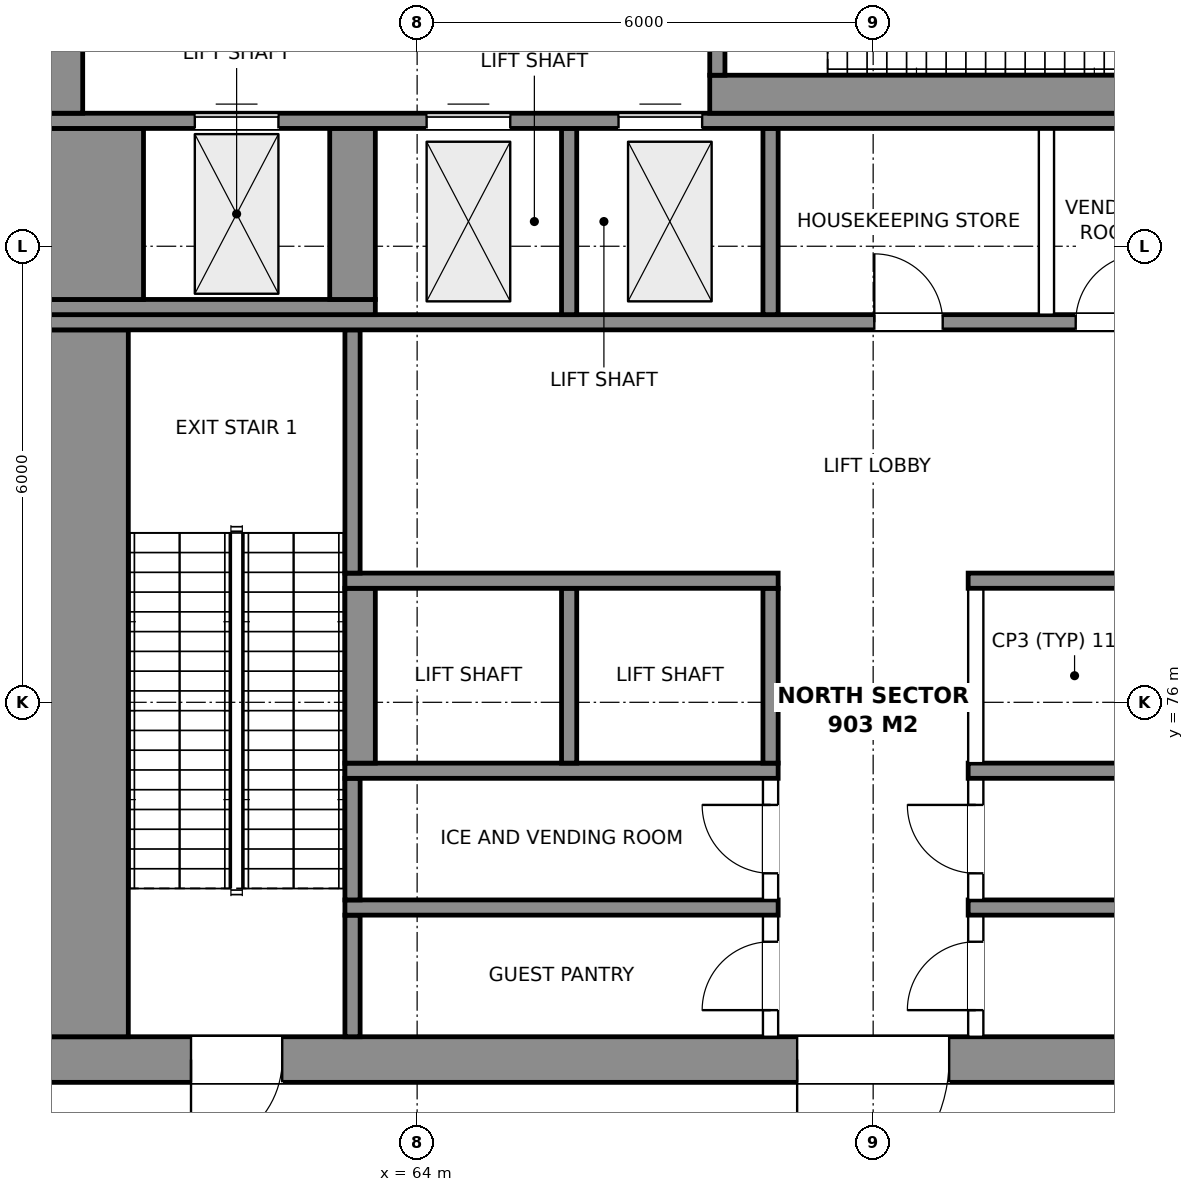
"""IFC4 building model, lengths in metres.
Left out: names, types, materials, properties, quantities, classifications, styles, units other than length and angle.
Written with IfcOpenShell. Run it as: python <this file> out.ifc"""

import sys

from ifc_helpers import new_model, si_unit, direction, frame, frame_2d, origin, place, context, subcontext, project, spatial, rectangle, extrude, element, fill, save


model = new_model("IFC4")
c1 = context("Model", 3, precision=1e-05, world=origin(), true_north=direction((0.0, 1.0)))
c2 = subcontext(c1, "Body", "Model", "MODEL_VIEW")
j1 = project(units=[si_unit("LENGTHUNIT", "METRE"), si_unit("PLANEANGLEUNIT", "RADIAN")], contexts=[c1])
p1 = place(None, origin())
s1 = spatial("IfcSite", under=j1, at=p1, CompositionType="ELEMENT")
p2 = place(p1, origin())
s2 = spatial("IfcBuilding", under=s1, at=p2, CompositionType="ELEMENT")
p3 = place(p2, frame((0.0, 0.0, 321.7)))
s3 = spatial("IfcBuildingStorey", under=s2, at=p3, CompositionType="ELEMENT", Elevation=321.7)
p4 = place(p3, frame((59.0, 71.3, 0.0), z_axis=(0.0, 0.0, 1.0), x_axis=(1.0, 0.0, 0.0)))
e1 = element("IfcWall", 1, at=p4, inside=s3, PredefinedType="SHEAR", context=c2, shape_type="SweptSolid", body=[
    extrude(rectangle(XDim=22.0, YDim=0.6, at=frame_2d((11.0, 0.0))), origin(), (0.0, 0.0, 1.0), 7.0),
])
p5 = place(p4, frame((2.025, 0.0, 0.0)))
e2 = element("IfcOpeningElement", 2, at=p5, cuts=e1, PredefinedType="OPENING", context=c2, shape_type="SweptSolid", body=[
    extrude(rectangle(XDim=1.2, YDim=2.1, at=frame_2d((0.6, 1.05))), frame((0.0, 0.31, 0.0), z_axis=(0.0, -1.0, 0.0), x_axis=(1.0, 0.0, 0.0)), (0.0, 0.0, 1.0), 0.62),
])
p6 = place(p4, frame((18.775, 0.0, 0.0)))
e3 = element("IfcOpeningElement", 3, at=p6, cuts=e1, PredefinedType="OPENING", context=c2, shape_type="SweptSolid", body=[
    extrude(rectangle(XDim=1.2, YDim=2.1, at=frame_2d((0.6, 1.05))), frame((0.0, 0.31, 0.0), z_axis=(0.0, -1.0, 0.0), x_axis=(1.0, 0.0, 0.0)), (0.0, 0.0, 1.0), 0.62),
])
p7 = place(p4, frame((10.0, 0.0, 0.0)))
e4 = element("IfcOpeningElement", 4, at=p7, cuts=e1, PredefinedType="OPENING", context=c2, shape_type="SweptSolid", body=[
    extrude(rectangle(XDim=2.0, YDim=2.1, at=frame_2d((1.0, 1.05))), frame((0.0, 0.31, 0.0), z_axis=(0.0, -1.0, 0.0), x_axis=(1.0, 0.0, 0.0)), (0.0, 0.0, 1.0), 0.62),
])
p8 = place(p3, frame((59.6, 71.6, 0.0), z_axis=(0.0, 0.0, 1.0), x_axis=(0.0, 1.0, 0.0)))
e5 = element("IfcWall", 5, at=p8, inside=s3, PredefinedType="SHEAR", context=c2, shape_type="SweptSolid", body=[
    extrude(rectangle(XDim=9.3, YDim=1.2, at=frame_2d((4.65, 0.0))), origin(), (0.0, 0.0, 1.0), 7.0),
])
p9 = place(p3, frame((63.15, 71.6, 0.0), z_axis=(0.0, 0.0, 1.0), x_axis=(0.0, 1.0, 0.0)))
e6 = element("IfcWall", 6, at=p9, inside=s3, PredefinedType="SHEAR", context=c2, shape_type="SweptSolid", body=[
    extrude(rectangle(XDim=1.6, YDim=0.2, at=frame_2d((0.8, 0.0))), origin(), (0.0, 0.0, 1.0), 7.0),
])
p10 = place(p3, frame((68.65, 71.6, 0.0), z_axis=(0.0, 0.0, 1.0), x_axis=(0.0, 1.0, 0.0)))
e7 = element("IfcWall", 7, at=p10, inside=s3, PredefinedType="PARTITIONING", context=c2, shape_type="SweptSolid", body=[
    extrude(rectangle(XDim=1.6, YDim=0.2, at=frame_2d((0.8, 0.0))), origin(), (0.0, 0.0, 1.0), 6.7),
])
p11 = place(p10, frame((0.35, 0.0, 0.0)))
e8 = element("IfcOpeningElement", 8, at=p11, cuts=e7, PredefinedType="OPENING", context=c2, shape_type="SweptSolid", body=[
    extrude(rectangle(XDim=0.9, YDim=2.1, at=frame_2d((0.45, 1.05))), frame((0.0, 0.11, 0.0), z_axis=(0.0, -1.0, 0.0), x_axis=(1.0, 0.0, 0.0)), (0.0, 0.0, 1.0), 0.22),
])
p12 = place(p3, frame((71.35, 71.6, 0.0), z_axis=(0.0, 0.0, 1.0), x_axis=(0.0, 1.0, 0.0)))
e9 = element("IfcWall", 9, at=p12, inside=s3, PredefinedType="PARTITIONING", context=c2, shape_type="SweptSolid", body=[
    extrude(rectangle(XDim=1.6, YDim=0.2, at=frame_2d((0.8, 0.0))), origin(), (0.0, 0.0, 1.0), 6.7),
])
p13 = place(p12, frame((0.35, 0.0, 0.0)))
e10 = element("IfcOpeningElement", 10, at=p13, cuts=e9, PredefinedType="OPENING", context=c2, shape_type="SweptSolid", body=[
    extrude(rectangle(XDim=0.9, YDim=2.1, at=frame_2d((0.45, 1.05))), frame((0.0, 0.11, 0.0), z_axis=(0.0, -1.0, 0.0), x_axis=(1.0, 0.0, 0.0)), (0.0, 0.0, 1.0), 0.22),
])
for number, where, z_axis, x_axis in (
    (11, (63.05, 73.3, 0.0), (0.0, 0.0, 1.0), (1.0, 0.0, 0.0)),
    (12, (71.25, 73.3, 0.0), (0.0, 0.0, 1.0), (1.0, 0.0, 0.0)),
):
    element("IfcWall", number, at=place(p3, frame(where, z_axis=z_axis, x_axis=x_axis)), inside=s3, PredefinedType="SHEAR", context=c2, shape_type="SweptSolid", body=[
        extrude(rectangle(XDim=5.7, YDim=0.2, at=frame_2d((2.85, 0.0))), origin(), (0.0, 0.0, 1.0), 7.0),
    ])
p14 = place(p3, frame((63.15, 73.4, 0.0), z_axis=(0.0, 0.0, 1.0), x_axis=(0.0, 1.0, 0.0)))
e13 = element("IfcWall", 13, at=p14, inside=s3, PredefinedType="SHEAR", context=c2, shape_type="SweptSolid", body=[
    extrude(rectangle(XDim=1.6, YDim=0.2, at=frame_2d((0.8, 0.0))), origin(), (0.0, 0.0, 1.0), 7.0),
])
p15 = place(p3, frame((68.65, 73.4, 0.0), z_axis=(0.0, 0.0, 1.0), x_axis=(0.0, 1.0, 0.0)))
e14 = element("IfcWall", 14, at=p15, inside=s3, PredefinedType="PARTITIONING", context=c2, shape_type="SweptSolid", body=[
    extrude(rectangle(XDim=1.6, YDim=0.2, at=frame_2d((0.8, 0.0))), origin(), (0.0, 0.0, 1.0), 6.7),
])
p16 = place(p15, frame((0.35, 0.0, 0.0)))
e15 = element("IfcOpeningElement", 15, at=p16, cuts=e14, PredefinedType="OPENING", context=c2, shape_type="SweptSolid", body=[
    extrude(rectangle(XDim=0.9, YDim=2.1, at=frame_2d((0.45, 1.05))), frame((0.0, 0.11, 0.0), z_axis=(0.0, -1.0, 0.0), x_axis=(1.0, 0.0, 0.0)), (0.0, 0.0, 1.0), 0.22),
])
p17 = place(p3, frame((71.35, 73.4, 0.0), z_axis=(0.0, 0.0, 1.0), x_axis=(0.0, 1.0, 0.0)))
e16 = element("IfcWall", 16, at=p17, inside=s3, PredefinedType="PARTITIONING", context=c2, shape_type="SweptSolid", body=[
    extrude(rectangle(XDim=1.6, YDim=0.2, at=frame_2d((0.8, 0.0))), origin(), (0.0, 0.0, 1.0), 6.7),
])
p18 = place(p17, frame((0.35, 0.0, 0.0)))
e17 = element("IfcOpeningElement", 17, at=p18, cuts=e16, PredefinedType="OPENING", context=c2, shape_type="SweptSolid", body=[
    extrude(rectangle(XDim=0.9, YDim=2.1, at=frame_2d((0.45, 1.05))), frame((0.0, 0.11, 0.0), z_axis=(0.0, -1.0, 0.0), x_axis=(1.0, 0.0, 0.0)), (0.0, 0.0, 1.0), 0.22),
])
for number, where, z_axis, x_axis in (
    (18, (63.05, 75.1, 0.0), (0.0, 0.0, 1.0), (1.0, 0.0, 0.0)),
    (19, (71.25, 75.1, 0.0), (0.0, 0.0, 1.0), (1.0, 0.0, 0.0)),
):
    element("IfcWall", number, at=place(p3, frame(where, z_axis=z_axis, x_axis=x_axis)), inside=s3, PredefinedType="SHEAR", context=c2, shape_type="SweptSolid", body=[
        extrude(rectangle(XDim=5.7, YDim=0.2, at=frame_2d((2.85, 0.0))), origin(), (0.0, 0.0, 1.0), 7.0),
    ])
p19 = place(p3, frame((63.25, 75.2, 0.0), z_axis=(0.0, 0.0, 1.0), x_axis=(0.0, 1.0, 0.0)))
e20 = element("IfcWall", 20, at=p19, inside=s3, PredefinedType="SHEAR", context=c2, shape_type="SweptSolid", body=[
    extrude(rectangle(XDim=2.3, YDim=0.4, at=frame_2d((1.15, 0.0))), origin(), (0.0, 0.0, 1.0), 7.0),
])
for number, where, z_axis, x_axis in (
    (21, (66.0, 75.2, 0.0), (0.0, 0.0, 1.0), (0.0, 1.0, 0.0)),
    (22, (68.65, 75.2, 0.0), (0.0, 0.0, 1.0), (0.0, 1.0, 0.0)),
):
    element("IfcWall", number, at=place(p3, frame(where, z_axis=z_axis, x_axis=x_axis)), inside=s3, PredefinedType="SHEAR", context=c2, shape_type="SweptSolid", body=[
        extrude(rectangle(XDim=2.3, YDim=0.2, at=frame_2d((1.15, 0.0))), origin(), (0.0, 0.0, 1.0), 7.0),
    ])
p20 = place(p3, frame((71.35, 75.2, 0.0), z_axis=(0.0, 0.0, 1.0), x_axis=(0.0, 1.0, 0.0)))
e23 = element("IfcWall", 23, at=p20, inside=s3, PredefinedType="PARTITIONING", context=c2, shape_type="SweptSolid", body=[
    extrude(rectangle(XDim=2.3, YDim=0.2, at=frame_2d((1.15, 0.0))), origin(), (0.0, 0.0, 1.0), 6.7),
])
p21 = place(p3, frame((63.05, 77.6, 0.0), z_axis=(0.0, 0.0, 1.0), x_axis=(1.0, 0.0, 0.0)))
e24 = element("IfcWall", 24, at=p21, inside=s3, PredefinedType="SHEAR", context=c2, shape_type="SweptSolid", body=[
    extrude(rectangle(XDim=5.7, YDim=0.2, at=frame_2d((2.85, 0.0))), origin(), (0.0, 0.0, 1.0), 7.0),
])
p22 = place(p3, frame((71.25, 77.6, 0.0), z_axis=(0.0, 0.0, 1.0), x_axis=(1.0, 0.0, 0.0)))
e25 = element("IfcWall", 25, at=p22, inside=s3, PredefinedType="SHEAR", context=c2, shape_type="SweptSolid", body=[
    extrude(rectangle(XDim=5.7, YDim=0.2, at=frame_2d((2.85, 0.0))), origin(), (0.0, 0.0, 1.0), 7.0),
])
p23 = place(p22, frame((2.3, 0.0, 0.0)))
e26 = element("IfcOpeningElement", 26, at=p23, cuts=e25, PredefinedType="OPENING", context=c2, shape_type="SweptSolid", body=[
    extrude(rectangle(XDim=0.9, YDim=2.1, at=frame_2d((0.45, 1.05))), frame((0.0, 0.11, 0.0), z_axis=(0.0, -1.0, 0.0), x_axis=(1.0, 0.0, 0.0)), (0.0, 0.0, 1.0), 0.22),
])
p24 = place(p3, frame((63.15, 77.7, 0.0), z_axis=(0.0, 0.0, 1.0), x_axis=(0.0, 1.0, 0.0)))
e27 = element("IfcWall", 27, at=p24, inside=s3, PredefinedType="SHEAR", context=c2, shape_type="SweptSolid", body=[
    extrude(rectangle(XDim=3.2, YDim=0.2, at=frame_2d((1.6, 0.0))), origin(), (0.0, 0.0, 1.0), 7.0),
])
p25 = place(p3, frame((59.0, 81.0, 0.0), z_axis=(0.0, 0.0, 1.0), x_axis=(1.0, 0.0, 0.0)))
e28 = element("IfcWall", 28, at=p25, inside=s3, PredefinedType="SHEAR", context=c2, shape_type="SweptSolid", body=[
    extrude(rectangle(XDim=22.0, YDim=0.2, at=frame_2d((11.0, 0.0))), origin(), (0.0, 0.0, 1.0), 7.0),
])
p26 = place(p25, frame((15.725, 0.0, 0.0)))
e29 = element("IfcOpeningElement", 29, at=p26, cuts=e28, PredefinedType="OPENING", context=c2, shape_type="SweptSolid", body=[
    extrude(rectangle(XDim=1.1, YDim=2.1, at=frame_2d((0.55, 1.05))), frame((0.0, 0.11, 0.0), z_axis=(0.0, -1.0, 0.0), x_axis=(1.0, 0.0, 0.0)), (0.0, 0.0, 1.0), 0.22),
])
p27 = place(p25, frame((11.015, 0.0, 0.0)))
e30 = element("IfcOpeningElement", 30, at=p27, cuts=e28, PredefinedType="OPENING", context=c2, shape_type="SweptSolid", body=[
    extrude(rectangle(XDim=0.9, YDim=2.1, at=frame_2d((0.45, 1.05))), frame((0.0, 0.11, 0.0), z_axis=(0.0, -1.0, 0.0), x_axis=(1.0, 0.0, 0.0)), (0.0, 0.0, 1.0), 0.22),
])
p28 = place(p25, frame((13.665, 0.0, 0.0)))
e31 = element("IfcOpeningElement", 31, at=p28, cuts=e28, PredefinedType="OPENING", context=c2, shape_type="SweptSolid", body=[
    extrude(rectangle(XDim=0.9, YDim=2.1, at=frame_2d((0.45, 1.05))), frame((0.0, 0.11, 0.0), z_axis=(0.0, -1.0, 0.0), x_axis=(1.0, 0.0, 0.0)), (0.0, 0.0, 1.0), 0.22),
])
p29 = place(p3, frame((59.0, 81.2, 0.0), z_axis=(0.0, 0.0, 1.0), x_axis=(1.0, 0.0, 0.0)))
e32 = element("IfcWall", 32, at=p29, inside=s3, PredefinedType="SHEAR", context=c2, shape_type="SweptSolid", body=[
    extrude(rectangle(XDim=4.45, YDim=0.2, at=frame_2d((2.225, 0.0))), origin(), (0.0, 0.0, 1.0), 7.0),
])
for number, where, z_axis, x_axis in (
    (33, (66.0, 81.1, 0.0), (0.0, 0.0, 1.0), (0.0, 1.0, 0.0)),
    (34, (68.65, 81.1, 0.0), (0.0, 0.0, 1.0), (0.0, 1.0, 0.0)),
):
    element("IfcWall", number, at=place(p3, frame(where, z_axis=z_axis, x_axis=x_axis)), inside=s3, PredefinedType="SHEAR", context=c2, shape_type="SweptSolid", body=[
        extrude(rectangle(XDim=2.45, YDim=0.2, at=frame_2d((1.225, 0.0))), origin(), (0.0, 0.0, 1.0), 7.0),
    ])
p30 = place(p3, frame((72.28, 81.1, 0.0), z_axis=(0.0, 0.0, 1.0), x_axis=(0.0, 1.0, 0.0)))
e35 = element("IfcWall", 35, at=p30, inside=s3, PredefinedType="PARTITIONING", context=c2, shape_type="SweptSolid", body=[
    extrude(rectangle(XDim=2.45, YDim=0.2, at=frame_2d((1.225, 0.0))), origin(), (0.0, 0.0, 1.0), 6.7),
])
p31 = place(p3, frame((59.7, 81.3, 0.0), z_axis=(0.0, 0.0, 1.0), x_axis=(0.0, 1.0, 0.0)))
e36 = element("IfcWall", 36, at=p31, inside=s3, PredefinedType="SHEAR", context=c2, shape_type="SweptSolid", body=[
    extrude(rectangle(XDim=2.25, YDim=1.4, at=frame_2d((1.125, 0.0))), origin(), (0.0, 0.0, 1.0), 7.0),
])
p32 = place(p3, frame((63.15, 81.3, 0.0), z_axis=(0.0, 0.0, 1.0), x_axis=(0.0, 1.0, 0.0)))
e37 = element("IfcWall", 37, at=p32, inside=s3, PredefinedType="SHEAR", context=c2, shape_type="SweptSolid", body=[
    extrude(rectangle(XDim=2.25, YDim=0.6, at=frame_2d((1.125, 0.0))), origin(), (0.0, 0.0, 1.0), 7.0),
])
p33 = place(p3, frame((59.0, 83.65, 0.0), z_axis=(0.0, 0.0, 1.0), x_axis=(1.0, 0.0, 0.0)))
e38 = element("IfcWall", 38, at=p33, inside=s3, PredefinedType="SHEAR", context=c2, shape_type="SweptSolid", body=[
    extrude(rectangle(XDim=22.0, YDim=0.2, at=frame_2d((11.0, 0.0))), origin(), (0.0, 0.0, 1.0), 7.0),
])
p34 = place(p33, frame((5.125, 0.0, 0.0)))
e39 = element("IfcOpeningElement", 39, at=p34, cuts=e38, PredefinedType="OPENING", context=c2, shape_type="SweptSolid", body=[
    extrude(rectangle(XDim=1.1, YDim=2.1, at=frame_2d((0.55, 1.05))), frame((0.0, 0.11, 0.0), z_axis=(0.0, -1.0, 0.0), x_axis=(1.0, 0.0, 0.0)), (0.0, 0.0, 1.0), 0.22),
])
p35 = place(p33, frame((7.65, 0.0, 0.0)))
e40 = element("IfcOpeningElement", 40, at=p35, cuts=e38, PredefinedType="OPENING", context=c2, shape_type="SweptSolid", body=[
    extrude(rectangle(XDim=1.1, YDim=2.1, at=frame_2d((0.55, 1.05))), frame((0.0, 0.11, 0.0), z_axis=(0.0, -1.0, 0.0), x_axis=(1.0, 0.0, 0.0)), (0.0, 0.0, 1.0), 0.22),
])
p36 = place(p33, frame((18.775, 0.0, 0.0)))
e41 = element("IfcOpeningElement", 41, at=p36, cuts=e38, PredefinedType="OPENING", context=c2, shape_type="SweptSolid", body=[
    extrude(rectangle(XDim=1.2, YDim=2.1, at=frame_2d((0.6, 1.05))), frame((0.0, 0.11, 0.0), z_axis=(0.0, -1.0, 0.0), x_axis=(1.0, 0.0, 0.0)), (0.0, 0.0, 1.0), 0.22),
])
p37 = place(p33, frame((2.075, 0.0, 0.0)))
e42 = element("IfcOpeningElement", 42, at=p37, cuts=e38, PredefinedType="OPENING", context=c2, shape_type="SweptSolid", body=[
    extrude(rectangle(XDim=1.1, YDim=2.1, at=frame_2d((0.55, 1.05))), frame((0.0, 0.11, 0.0), z_axis=(0.0, -1.0, 0.0), x_axis=(1.0, 0.0, 0.0)), (0.0, 0.0, 1.0), 0.22),
])
p38 = place(p3, frame((59.3, 83.75, 0.0), z_axis=(0.0, 0.0, 1.0), x_axis=(0.0, 1.0, 0.0)))
e43 = element("IfcWall", 43, at=p38, inside=s3, PredefinedType="SHEAR", context=c2, shape_type="SweptSolid", body=[
    extrude(rectangle(XDim=3.65, YDim=0.6, at=frame_2d((1.825, 0.0))), origin(), (0.0, 0.0, 1.0), 7.0),
])
p39 = place(p38, frame((1.275, 0.0, 0.0)))
e44 = element("IfcOpeningElement", 44, at=p39, cuts=e43, PredefinedType="OPENING", context=c2, shape_type="SweptSolid", body=[
    extrude(rectangle(XDim=1.1, YDim=2.1, at=frame_2d((0.55, 1.05))), frame((0.0, 0.31, 0.0), z_axis=(0.0, -1.0, 0.0), x_axis=(1.0, 0.0, 0.0)), (0.0, 0.0, 1.0), 0.62),
])
p40 = place(p3, frame((67.85, 84.0, 0.0), z_axis=(0.0, 0.0, 1.0), x_axis=(1.0, 0.0, 0.0)))
e45 = element("IfcWall", 45, at=p40, inside=s3, PredefinedType="SHEAR", context=c2, shape_type="SweptSolid", body=[
    extrude(rectangle(XDim=9.1, YDim=0.5, at=frame_2d((4.55, 0.0))), origin(), (0.0, 0.0, 1.0), 7.0),
])
p41 = place(p3, frame((67.95, 84.25, 0.0), z_axis=(0.0, 0.0, 1.0), x_axis=(0.0, 1.0, 0.0)))
e46 = element("IfcWall", 46, at=p41, inside=s3, PredefinedType="SHEAR", context=c2, shape_type="SweptSolid", body=[
    extrude(rectangle(XDim=2.85, YDim=0.2, at=frame_2d((1.425, 0.0))), origin(), (0.0, 0.0, 1.0), 7.0),
])
p42 = place(p41, frame((0.825, 0.0, 0.0)))
e47 = element("IfcOpeningElement", 47, at=p42, cuts=e46, PredefinedType="OPENING", context=c2, shape_type="SweptSolid", body=[
    extrude(rectangle(XDim=1.2, YDim=2.1, at=frame_2d((0.6, 1.05))), frame((0.0, 0.11, 0.0), z_axis=(0.0, -1.0, 0.0), x_axis=(1.0, 0.0, 0.0)), (0.0, 0.0, 1.0), 0.22),
])
p43 = place(p5, frame((1.2, 0.0, 0.0), z_axis=(0.0, 0.0, 1.0), x_axis=(-1.0, 0.0, 0.0)))
e48 = element("IfcDoor", 48, at=p43, inside=s3, OperationType="SINGLE_SWING_RIGHT", PredefinedType="DOOR", context=c2, shape_type="SweptSolid", body=[
    extrude(rectangle(XDim=1.2, YDim=2.1, at=frame_2d((0.6, 1.05))), frame((0.0, 0.025, 0.0), z_axis=(0.0, -1.0, 0.0), x_axis=(1.0, 0.0, 0.0)), (0.0, 0.0, 1.0), 0.05),
])
fill(e2, e48)
p44 = place(p7, frame((2.0, 0.0, 0.0), z_axis=(0.0, 0.0, 1.0), x_axis=(-1.0, 0.0, 0.0)))
e49 = element("IfcDoor", 49, at=p44, inside=s3, OperationType="DOUBLE_DOOR_SINGLE_SWING", PredefinedType="DOOR", context=c2, shape_type="SweptSolid", body=[
    extrude(rectangle(XDim=2.0, YDim=2.1, at=frame_2d((1.0, 1.05))), frame((0.0, 0.025, 0.0), z_axis=(0.0, -1.0, 0.0), x_axis=(1.0, 0.0, 0.0)), (0.0, 0.0, 1.0), 0.05),
])
fill(e4, e49)
p45 = place(p11, origin())
e50 = element("IfcDoor", 50, at=p45, inside=s3, OperationType="SINGLE_SWING_LEFT", PredefinedType="DOOR", context=c2, shape_type="SweptSolid", body=[
    extrude(rectangle(XDim=0.9, YDim=2.1, at=frame_2d((0.45, 1.05))), frame((0.0, 0.025, 0.0), z_axis=(0.0, -1.0, 0.0), x_axis=(1.0, 0.0, 0.0)), (0.0, 0.0, 1.0), 0.05),
])
fill(e8, e50)
p46 = place(p16, origin())
e51 = element("IfcDoor", 51, at=p46, inside=s3, OperationType="SINGLE_SWING_RIGHT", PredefinedType="DOOR", context=c2, shape_type="SweptSolid", body=[
    extrude(rectangle(XDim=0.9, YDim=2.1, at=frame_2d((0.45, 1.05))), frame((0.0, 0.025, 0.0), z_axis=(0.0, -1.0, 0.0), x_axis=(1.0, 0.0, 0.0)), (0.0, 0.0, 1.0), 0.05),
])
fill(e15, e51)
p47 = place(p13, origin())
e52 = element("IfcDoor", 52, at=p47, inside=s3, OperationType="SINGLE_SWING_LEFT", PredefinedType="DOOR", context=c2, shape_type="SweptSolid", body=[
    extrude(rectangle(XDim=0.9, YDim=2.1, at=frame_2d((0.45, 1.05))), frame((0.0, 0.025, 0.0), z_axis=(0.0, -1.0, 0.0), x_axis=(1.0, 0.0, 0.0)), (0.0, 0.0, 1.0), 0.05),
])
fill(e10, e52)
p48 = place(p18, origin())
e53 = element("IfcDoor", 53, at=p48, inside=s3, OperationType="SINGLE_SWING_RIGHT", PredefinedType="DOOR", context=c2, shape_type="SweptSolid", body=[
    extrude(rectangle(XDim=0.9, YDim=2.1, at=frame_2d((0.45, 1.05))), frame((0.0, 0.025, 0.0), z_axis=(0.0, -1.0, 0.0), x_axis=(1.0, 0.0, 0.0)), (0.0, 0.0, 1.0), 0.05),
])
fill(e17, e53)
p49 = place(p34, origin())
e54 = element("IfcDoor", 54, at=p49, inside=s3, OperationType="DOUBLE_DOOR_SLIDING", PredefinedType="DOOR", context=c2, shape_type="SweptSolid", body=[
    extrude(rectangle(XDim=1.1, YDim=2.1, at=frame_2d((0.55, 1.05))), frame((0.0, 0.025, 0.0), z_axis=(0.0, -1.0, 0.0), x_axis=(1.0, 0.0, 0.0)), (0.0, 0.0, 1.0), 0.05),
])
fill(e39, e54)
p50 = place(p35, origin())
e55 = element("IfcDoor", 55, at=p50, inside=s3, OperationType="DOUBLE_DOOR_SLIDING", PredefinedType="DOOR", context=c2, shape_type="SweptSolid", body=[
    extrude(rectangle(XDim=1.1, YDim=2.1, at=frame_2d((0.55, 1.05))), frame((0.0, 0.025, 0.0), z_axis=(0.0, -1.0, 0.0), x_axis=(1.0, 0.0, 0.0)), (0.0, 0.0, 1.0), 0.05),
])
fill(e40, e55)
p51 = place(p37, origin())
e56 = element("IfcDoor", 56, at=p51, inside=s3, OperationType="DOUBLE_DOOR_SLIDING", PredefinedType="DOOR", context=c2, shape_type="SweptSolid", body=[
    extrude(rectangle(XDim=1.1, YDim=2.1, at=frame_2d((0.55, 1.05))), frame((0.0, 0.025, 0.0), z_axis=(0.0, -1.0, 0.0), x_axis=(1.0, 0.0, 0.0)), (0.0, 0.0, 1.0), 0.05),
])
fill(e42, e56)
p52 = place(p27, origin())
e57 = element("IfcDoor", 57, at=p52, inside=s3, OperationType="SINGLE_SWING_LEFT", PredefinedType="DOOR", context=c2, shape_type="SweptSolid", body=[
    extrude(rectangle(XDim=0.9, YDim=2.1, at=frame_2d((0.45, 1.05))), frame((0.0, 0.025, 0.0), z_axis=(0.0, -1.0, 0.0), x_axis=(1.0, 0.0, 0.0)), (0.0, 0.0, 1.0), 0.05),
])
fill(e30, e57)
p53 = place(p28, origin())
e58 = element("IfcDoor", 58, at=p53, inside=s3, OperationType="SINGLE_SWING_RIGHT", PredefinedType="DOOR", context=c2, shape_type="SweptSolid", body=[
    extrude(rectangle(XDim=0.9, YDim=2.1, at=frame_2d((0.45, 1.05))), frame((0.0, 0.025, 0.0), z_axis=(0.0, -1.0, 0.0), x_axis=(1.0, 0.0, 0.0)), (0.0, 0.0, 1.0), 0.05),
])
fill(e31, e58)
save(model, sys.argv[1])
